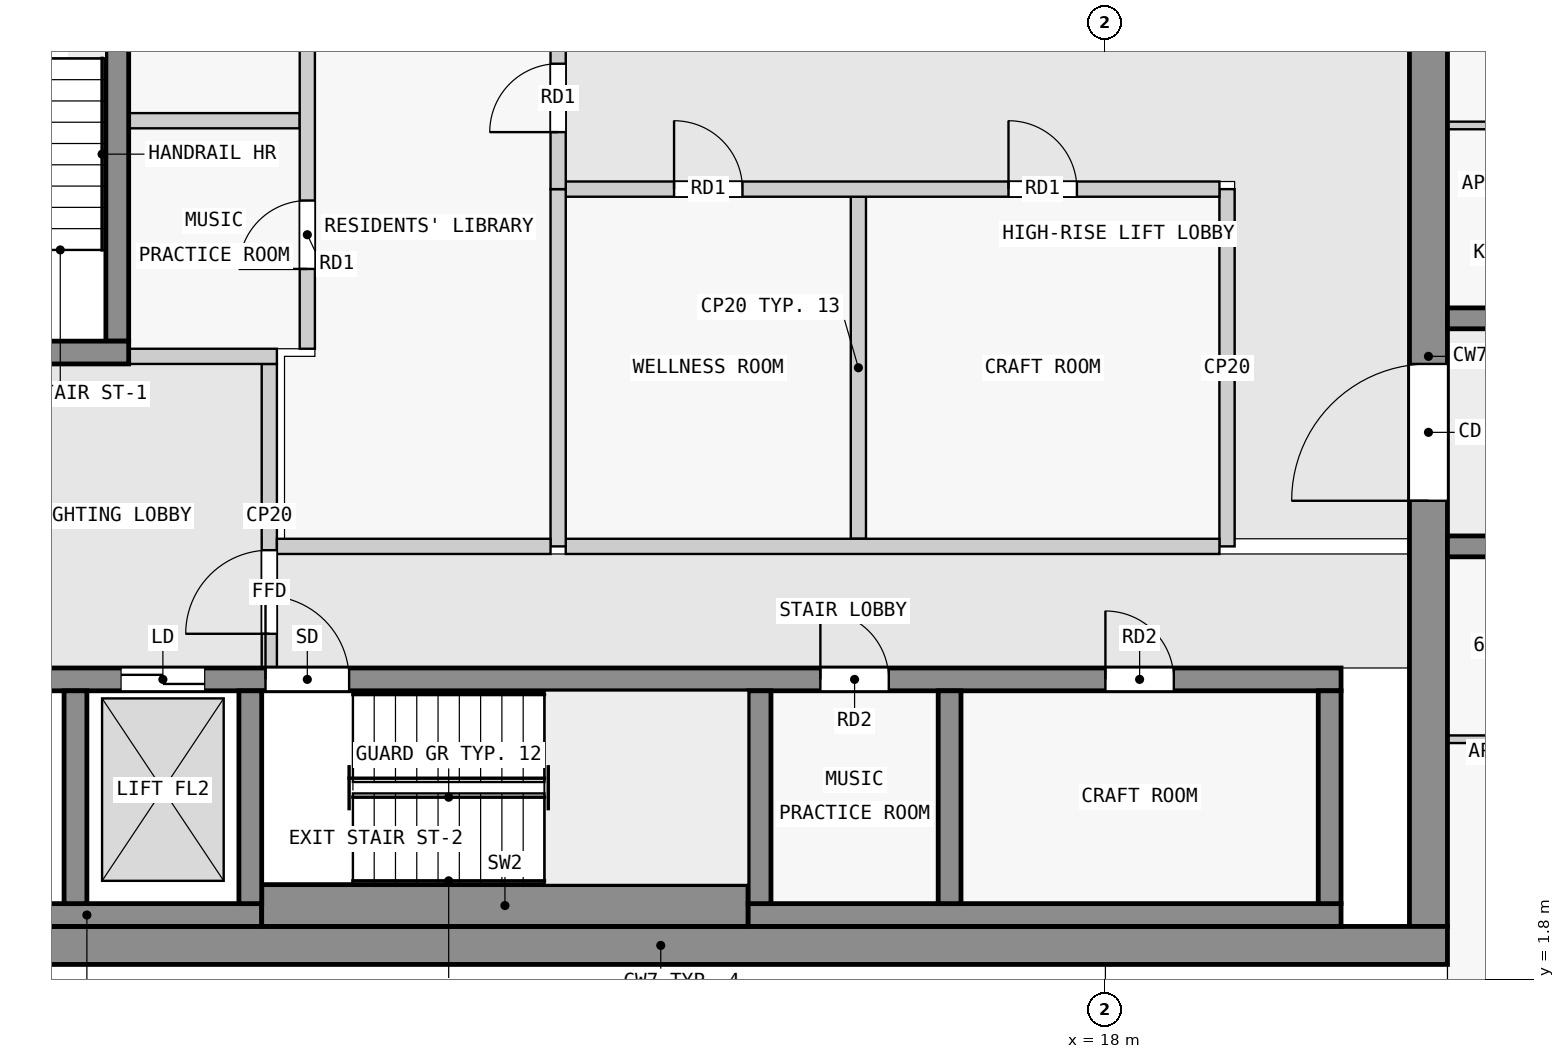
"""IFC4 building model, lengths in metres.
Left out: names, types, materials, properties, quantities, classifications, styles, units other than length and angle.
Written with IfcOpenShell. Run it as: python <this file> out.ifc"""

import sys

from ifc_helpers import new_model, si_unit, direction, frame, frame_2d, origin, place, context, subcontext, project, spatial, rectangle, extrude, element, fill, save


model = new_model("IFC4")
c1 = context("Model", 3, precision=1e-05, world=origin(), true_north=direction((0.0, 1.0)))
c2 = subcontext(c1, "Body", "Model", "MODEL_VIEW")
j1 = project(units=[si_unit("LENGTHUNIT", "METRE"), si_unit("PLANEANGLEUNIT", "RADIAN")], contexts=[c1])
p1 = place(None, origin())
s1 = spatial("IfcSite", under=j1, at=p1, CompositionType="ELEMENT")
p2 = place(p1, origin())
s2 = spatial("IfcBuilding", under=s1, at=p2, CompositionType="ELEMENT")
p3 = place(p2, frame((0.0, 0.0, 232.9)))
s3 = spatial("IfcBuildingStorey", under=s2, at=p3, CompositionType="ELEMENT", Elevation=232.9)
p4 = place(p3, frame((1.8, 2.25, 0.0), z_axis=(0.0, 0.0, 1.0), x_axis=(1.0, 0.0, 0.0)))
e1 = element("IfcWall", 1, at=p4, inside=s3, PredefinedType="SHEAR", context=c2, shape_type="SweptSolid", body=[
    extrude(rectangle(XDim=20.7, YDim=0.5, at=frame_2d((10.35, 0.0))), origin(), (0.0, 0.0, 1.0), 3.2),
])
p5 = place(p3, frame((22.25, 2.5, 0.0), z_axis=(0.0, 0.0, 1.0), x_axis=(0.0, 1.0, 0.0)))
e2 = element("IfcWall", 2, at=p5, inside=s3, PredefinedType="SHEAR", context=c2, shape_type="SweptSolid", body=[
    extrude(rectangle(XDim=15.0, YDim=0.5, at=frame_2d((7.5, 0.0))), origin(), (0.0, 0.0, 1.0), 3.2),
])
p6 = place(p5, frame((5.6, 0.0, 0.0)))
e3 = element("IfcOpeningElement", 3, at=p6, cuts=e2, PredefinedType="OPENING", context=c2, shape_type="SweptSolid", body=[
    extrude(rectangle(XDim=1.8, YDim=2.1, at=frame_2d((0.9, 1.05))), frame((0.0, 0.26, 0.0), z_axis=(0.0, -1.0, 0.0), x_axis=(1.0, 0.0, 0.0)), (0.0, 0.0, 1.0), 0.52),
])
p7 = place(p3, frame((2.3, 2.65, 0.0), z_axis=(0.0, 0.0, 1.0), x_axis=(1.0, 0.0, 0.0)))
e4 = element("IfcWall", 4, at=p7, inside=s3, PredefinedType="SHEAR", context=c2, shape_type="SweptSolid", body=[
    extrude(rectangle(XDim=4.6, YDim=0.3, at=frame_2d((2.3, 0.0))), origin(), (0.0, 0.0, 1.0), 3.2),
])
p8 = place(p3, frame((6.9, 2.775, 0.0), z_axis=(0.0, 0.0, 1.0), x_axis=(1.0, 0.0, 0.0)))
e5 = element("IfcWall", 5, at=p8, inside=s3, PredefinedType="SHEAR", context=c2, shape_type="SweptSolid", body=[
    extrude(rectangle(XDim=6.4, YDim=0.55, at=frame_2d((3.2, 0.0))), origin(), (0.0, 0.0, 1.0), 3.2),
])
p9 = place(p3, frame((13.3, 2.65, 0.0), z_axis=(0.0, 0.0, 1.0), x_axis=(1.0, 0.0, 0.0)))
e6 = element("IfcWall", 6, at=p9, inside=s3, PredefinedType="SHEAR", context=c2, shape_type="SweptSolid", body=[
    extrude(rectangle(XDim=7.8, YDim=0.3, at=frame_2d((3.9, 0.0))), origin(), (0.0, 0.0, 1.0), 3.2),
])
for number, where, z_axis, x_axis in (
    (7, (4.45, 2.8, 0.0), (0.0, 0.0, 1.0), (0.0, 1.0, 0.0)),
    (8, (6.75, 2.8, 0.0), (0.0, 0.0, 1.0), (0.0, 1.0, 0.0)),
    (9, (13.45, 2.8, 0.0), (0.0, 0.0, 1.0), (0.0, 1.0, 0.0)),
    (10, (15.95, 2.8, 0.0), (0.0, 0.0, 1.0), (0.0, 1.0, 0.0)),
    (11, (20.95, 2.8, 0.0), (0.0, 0.0, 1.0), (0.0, 1.0, 0.0)),
):
    element("IfcWall", number, at=place(p3, frame(where, z_axis=z_axis, x_axis=x_axis)), inside=s3, PredefinedType="SHEAR", context=c2, shape_type="SweptSolid", body=[
        extrude(rectangle(XDim=2.8, YDim=0.3, at=frame_2d((1.4, 0.0))), origin(), (0.0, 0.0, 1.0), 3.2),
    ])
p10 = place(p3, frame((2.3, 5.75, 0.0), z_axis=(0.0, 0.0, 1.0), x_axis=(1.0, 0.0, 0.0)))
e12 = element("IfcWall", 12, at=p10, inside=s3, PredefinedType="SHEAR", context=c2, shape_type="SweptSolid", body=[
    extrude(rectangle(XDim=18.8, YDim=0.3, at=frame_2d((9.4, 0.0))), origin(), (0.0, 0.0, 1.0), 3.2),
])
p11 = place(p10, frame((4.65, 0.0, 0.0)))
e13 = element("IfcOpeningElement", 13, at=p11, cuts=e12, PredefinedType="OPENING", context=c2, shape_type="SweptSolid", body=[
    extrude(rectangle(XDim=1.1, YDim=2.1, at=frame_2d((0.55, 1.05))), frame((0.0, 0.16, 0.0), z_axis=(0.0, -1.0, 0.0), x_axis=(1.0, 0.0, 0.0)), (0.0, 0.0, 1.0), 0.32),
])
p12 = place(p10, frame((0.45, 0.0, 0.0)))
e14 = element("IfcOpeningElement", 14, at=p12, cuts=e12, PredefinedType="OPENING", context=c2, shape_type="SweptSolid", body=[
    extrude(rectangle(XDim=1.1, YDim=2.1, at=frame_2d((0.55, 1.05))), frame((0.0, 0.16, 0.0), z_axis=(0.0, -1.0, 0.0), x_axis=(1.0, 0.0, 0.0)), (0.0, 0.0, 1.0), 0.32),
])
p13 = place(p10, frame((2.75, 0.0, 0.0)))
e15 = element("IfcOpeningElement", 15, at=p13, cuts=e12, PredefinedType="OPENING", context=c2, shape_type="SweptSolid", body=[
    extrude(rectangle(XDim=1.1, YDim=2.1, at=frame_2d((0.55, 1.05))), frame((0.0, 0.16, 0.0), z_axis=(0.0, -1.0, 0.0), x_axis=(1.0, 0.0, 0.0)), (0.0, 0.0, 1.0), 0.32),
])
p14 = place(p10, frame((11.95, 0.0, 0.0)))
e16 = element("IfcOpeningElement", 16, at=p14, cuts=e12, PredefinedType="OPENING", context=c2, shape_type="SweptSolid", body=[
    extrude(rectangle(XDim=0.9, YDim=2.1, at=frame_2d((0.45, 1.05))), frame((0.0, 0.16, 0.0), z_axis=(0.0, -1.0, 0.0), x_axis=(1.0, 0.0, 0.0)), (0.0, 0.0, 1.0), 0.32),
])
p15 = place(p10, frame((15.7, 0.0, 0.0)))
e17 = element("IfcOpeningElement", 17, at=p15, cuts=e12, PredefinedType="OPENING", context=c2, shape_type="SweptSolid", body=[
    extrude(rectangle(XDim=0.9, YDim=2.1, at=frame_2d((0.45, 1.05))), frame((0.0, 0.16, 0.0), z_axis=(0.0, -1.0, 0.0), x_axis=(1.0, 0.0, 0.0)), (0.0, 0.0, 1.0), 0.32),
])
p16 = place(p3, frame((2.3, 10.05, 0.0), z_axis=(0.0, 0.0, 1.0), x_axis=(1.0, 0.0, 0.0)))
e18 = element("IfcWall", 18, at=p16, inside=s3, PredefinedType="SHEAR", context=c2, shape_type="SweptSolid", body=[
    extrude(rectangle(XDim=2.85, YDim=0.3, at=frame_2d((1.425, 0.0))), origin(), (0.0, 0.0, 1.0), 3.2),
])
p17 = place(p16, frame((0.25, 0.0, 0.0)))
e19 = element("IfcOpeningElement", 19, at=p17, cuts=e18, PredefinedType="OPENING", context=c2, shape_type="SweptSolid", body=[
    extrude(rectangle(XDim=1.1, YDim=2.1, at=frame_2d((0.55, 1.05))), frame((0.0, 0.16, 0.0), z_axis=(0.0, -1.0, 0.0), x_axis=(1.0, 0.0, 0.0)), (0.0, 0.0, 1.0), 0.32),
])
p18 = place(p3, frame((5.0, 10.2, 0.0), z_axis=(0.0, 0.0, 1.0), x_axis=(0.0, 1.0, 0.0)))
e20 = element("IfcWall", 20, at=p18, inside=s3, PredefinedType="SHEAR", context=c2, shape_type="SweptSolid", body=[
    extrude(rectangle(XDim=6.4, YDim=0.3, at=frame_2d((3.2, 0.0))), origin(), (0.0, 0.0, 1.0), 3.2),
])
p19 = place(p3, frame((22.5, 7.5, 0.0), z_axis=(0.0, 0.0, 1.0), x_axis=(1.0, 0.0, 0.0)))
e21 = element("IfcWall", 21, at=p19, inside=s3, PredefinedType="SHEAR", context=c2, shape_type="SweptSolid", body=[
    extrude(rectangle(XDim=22.5, YDim=0.275, at=frame_2d((11.25, 0.0))), origin(), (0.0, 0.0, 1.0), 3.2),
])
p20 = place(p19, frame((1.75, 0.0, 0.0)))
e22 = element("IfcOpeningElement", 22, at=p20, cuts=e21, PredefinedType="OPENING", context=c2, shape_type="SweptSolid", body=[
    extrude(rectangle(XDim=1.0, YDim=2.1, at=frame_2d((0.5, 1.05))), frame((0.0, 0.147, 0.0), z_axis=(0.0, -1.0, 0.0), x_axis=(1.0, 0.0, 0.0)), (0.0, 0.0, 1.0), 0.295),
])
p21 = place(p19, frame((5.85, 0.0, 0.0)))
e23 = element("IfcOpeningElement", 23, at=p21, cuts=e21, PredefinedType="OPENING", context=c2, shape_type="SweptSolid", body=[
    extrude(rectangle(XDim=1.8, YDim=2.1, at=frame_2d((0.9, 1.05))), frame((0.0, 0.147, 0.0), z_axis=(0.0, -1.0, 0.0), x_axis=(1.0, 0.0, 0.0)), (0.0, 0.0, 1.0), 0.295),
])
p22 = place(p19, frame((10.75, 0.0, 0.0)))
e24 = element("IfcOpeningElement", 24, at=p22, cuts=e21, PredefinedType="OPENING", context=c2, shape_type="SweptSolid", body=[
    extrude(rectangle(XDim=1.0, YDim=2.1, at=frame_2d((0.5, 1.05))), frame((0.0, 0.147, 0.0), z_axis=(0.0, -1.0, 0.0), x_axis=(1.0, 0.0, 0.0)), (0.0, 0.0, 1.0), 0.295),
])
p23 = place(p19, frame((16.85, 0.0, 0.0)))
e25 = element("IfcOpeningElement", 25, at=p23, cuts=e21, PredefinedType="OPENING", context=c2, shape_type="SweptSolid", body=[
    extrude(rectangle(XDim=1.0, YDim=2.1, at=frame_2d((0.5, 1.05))), frame((0.0, 0.147, 0.0), z_axis=(0.0, -1.0, 0.0), x_axis=(1.0, 0.0, 0.0)), (0.0, 0.0, 1.0), 0.295),
])
p24 = place(p3, frame((22.5, 10.5, 0.0), z_axis=(0.0, 0.0, 1.0), x_axis=(1.0, 0.0, 0.0)))
e26 = element("IfcWall", 26, at=p24, inside=s3, PredefinedType="SHEAR", context=c2, shape_type="SweptSolid", body=[
    extrude(rectangle(XDim=22.5, YDim=0.275, at=frame_2d((11.25, 0.0))), origin(), (0.0, 0.0, 1.0), 3.2),
])
p25 = place(p24, frame((4.05, 0.0, 0.0)))
e27 = element("IfcOpeningElement", 27, at=p25, cuts=e26, PredefinedType="OPENING", context=c2, shape_type="SweptSolid", body=[
    extrude(rectangle(XDim=1.0, YDim=2.1, at=frame_2d((0.5, 1.05))), frame((0.0, 0.147, 0.0), z_axis=(0.0, -1.0, 0.0), x_axis=(1.0, 0.0, 0.0)), (0.0, 0.0, 1.0), 0.295),
])
p26 = place(p24, frame((10.75, 0.0, 0.0)))
e28 = element("IfcOpeningElement", 28, at=p26, cuts=e26, PredefinedType="OPENING", context=c2, shape_type="SweptSolid", body=[
    extrude(rectangle(XDim=1.0, YDim=2.1, at=frame_2d((0.5, 1.05))), frame((0.0, 0.147, 0.0), z_axis=(0.0, -1.0, 0.0), x_axis=(1.0, 0.0, 0.0)), (0.0, 0.0, 1.0), 0.295),
])
p27 = place(p24, frame((15.25, 0.0, 0.0)))
e29 = element("IfcOpeningElement", 29, at=p27, cuts=e26, PredefinedType="OPENING", context=c2, shape_type="SweptSolid", body=[
    extrude(rectangle(XDim=1.0, YDim=2.1, at=frame_2d((0.5, 1.05))), frame((0.0, 0.147, 0.0), z_axis=(0.0, -1.0, 0.0), x_axis=(1.0, 0.0, 0.0)), (0.0, 0.0, 1.0), 0.295),
])
p28 = place(p24, frame((18.75, 0.0, 0.0)))
e30 = element("IfcOpeningElement", 30, at=p28, cuts=e26, PredefinedType="OPENING", context=c2, shape_type="SweptSolid", body=[
    extrude(rectangle(XDim=0.9, YDim=2.1, at=frame_2d((0.45, 1.05))), frame((0.0, 0.147, 0.0), z_axis=(0.0, -1.0, 0.0), x_axis=(1.0, 0.0, 0.0)), (0.0, 0.0, 1.0), 0.295),
])
p29 = place(p24, frame((20.95, 0.0, 0.0)))
e31 = element("IfcOpeningElement", 31, at=p29, cuts=e26, PredefinedType="OPENING", context=c2, shape_type="SweptSolid", body=[
    extrude(rectangle(XDim=1.0, YDim=2.1, at=frame_2d((0.5, 1.05))), frame((0.0, 0.147, 0.0), z_axis=(0.0, -1.0, 0.0), x_axis=(1.0, 0.0, 0.0)), (0.0, 0.0, 1.0), 0.295),
])
p30 = place(p3, frame((7.0, 5.9, 0.0), z_axis=(0.0, 0.0, 1.0), x_axis=(0.0, 1.0, 0.0)))
e32 = element("IfcWall", 32, at=p30, inside=s3, PredefinedType="PARTITIONING", context=c2, shape_type="SweptSolid", body=[
    extrude(rectangle(XDim=4.0, YDim=0.2, at=frame_2d((2.0, 0.0))), origin(), (0.0, 0.0, 1.0), 3.2),
])
p31 = place(p30, frame((0.45, 0.0, 0.0)))
e33 = element("IfcOpeningElement", 33, at=p31, cuts=e32, PredefinedType="OPENING", context=c2, shape_type="SweptSolid", body=[
    extrude(rectangle(XDim=1.1, YDim=2.1, at=frame_2d((0.55, 1.05))), frame((0.0, 0.11, 0.0), z_axis=(0.0, -1.0, 0.0), x_axis=(1.0, 0.0, 0.0)), (0.0, 0.0, 1.0), 0.22),
])
p32 = place(p3, frame((5.15, 10.0, 0.0), z_axis=(0.0, 0.0, 1.0), x_axis=(1.0, 0.0, 0.0)))
e34 = element("IfcWall", 34, at=p32, inside=s3, PredefinedType="PARTITIONING", context=c2, shape_type="SweptSolid", body=[
    extrude(rectangle(XDim=1.95, YDim=0.2, at=frame_2d((0.975, 0.0))), origin(), (0.0, 0.0, 1.0), 3.2),
])
p33 = place(p3, frame((7.1, 7.5, 0.0), z_axis=(0.0, 0.0, 1.0), x_axis=(1.0, 0.0, 0.0)))
e35 = element("IfcWall", 35, at=p33, inside=s3, PredefinedType="PARTITIONING", context=c2, shape_type="SweptSolid", body=[
    extrude(rectangle(XDim=3.6, YDim=0.2, at=frame_2d((1.8, 0.0))), origin(), (0.0, 0.0, 1.0), 3.2),
])
p34 = place(p3, frame((10.8, 12.2, 0.0), z_axis=(0.0, 0.0, 1.0), x_axis=(0.0, 1.0, 0.0)))
e36 = element("IfcWall", 36, at=p34, inside=s3, PredefinedType="PARTITIONING", context=c2, shape_type="SweptSolid", body=[
    extrude(rectangle(XDim=2.4, YDim=0.2, at=frame_2d((1.2, 0.0))), origin(), (0.0, 0.0, 1.0), 3.2),
])
p35 = place(p34, frame((0.75, 0.0, 0.0)))
e37 = element("IfcOpeningElement", 37, at=p35, cuts=e36, PredefinedType="OPENING", context=c2, shape_type="SweptSolid", body=[
    extrude(rectangle(XDim=0.9, YDim=2.1, at=frame_2d((0.45, 1.05))), frame((0.0, 0.11, 0.0), z_axis=(0.0, -1.0, 0.0), x_axis=(1.0, 0.0, 0.0)), (0.0, 0.0, 1.0), 0.22),
])
p36 = place(p3, frame((10.8, 7.5, 0.0), z_axis=(0.0, 0.0, 1.0), x_axis=(0.0, 1.0, 0.0)))
e38 = element("IfcWall", 38, at=p36, inside=s3, PredefinedType="PARTITIONING", context=c2, shape_type="SweptSolid", body=[
    extrude(rectangle(XDim=4.7, YDim=0.2, at=frame_2d((2.35, 0.0))), origin(), (0.0, 0.0, 1.0), 3.2),
])
p37 = place(p3, frame((10.9, 7.5, 0.0), z_axis=(0.0, 0.0, 1.0), x_axis=(1.0, 0.0, 0.0)))
e39 = element("IfcWall", 39, at=p37, inside=s3, PredefinedType="PARTITIONING", context=c2, shape_type="SweptSolid", body=[
    extrude(rectangle(XDim=8.6, YDim=0.2, at=frame_2d((4.3, 0.0))), origin(), (0.0, 0.0, 1.0), 3.2),
])
p38 = place(p3, frame((19.6, 7.5, 0.0), z_axis=(0.0, 0.0, 1.0), x_axis=(0.0, 1.0, 0.0)))
e40 = element("IfcWall", 40, at=p38, inside=s3, PredefinedType="PARTITIONING", context=c2, shape_type="SweptSolid", body=[
    extrude(rectangle(XDim=4.7, YDim=0.2, at=frame_2d((2.35, 0.0))), origin(), (0.0, 0.0, 1.0), 3.2),
])
p39 = place(p3, frame((10.9, 12.2, 0.0), z_axis=(0.0, 0.0, 1.0), x_axis=(1.0, 0.0, 0.0)))
e41 = element("IfcWall", 41, at=p39, inside=s3, PredefinedType="PARTITIONING", context=c2, shape_type="SweptSolid", body=[
    extrude(rectangle(XDim=8.6, YDim=0.2, at=frame_2d((4.3, 0.0))), origin(), (0.0, 0.0, 1.0), 3.2),
])
p40 = place(p39, frame((1.425, 0.0, 0.0)))
e42 = element("IfcOpeningElement", 42, at=p40, cuts=e41, PredefinedType="OPENING", context=c2, shape_type="SweptSolid", body=[
    extrude(rectangle(XDim=0.9, YDim=2.1, at=frame_2d((0.45, 1.05))), frame((0.0, 0.11, 0.0), z_axis=(0.0, -1.0, 0.0), x_axis=(1.0, 0.0, 0.0)), (0.0, 0.0, 1.0), 0.22),
])
p41 = place(p39, frame((5.825, 0.0, 0.0)))
e43 = element("IfcOpeningElement", 43, at=p41, cuts=e41, PredefinedType="OPENING", context=c2, shape_type="SweptSolid", body=[
    extrude(rectangle(XDim=0.9, YDim=2.1, at=frame_2d((0.45, 1.05))), frame((0.0, 0.11, 0.0), z_axis=(0.0, -1.0, 0.0), x_axis=(1.0, 0.0, 0.0)), (0.0, 0.0, 1.0), 0.22),
])
p42 = place(p3, frame((14.75, 7.6, 0.0), z_axis=(0.0, 0.0, 1.0), x_axis=(0.0, 1.0, 0.0)))
e44 = element("IfcWall", 44, at=p42, inside=s3, PredefinedType="PARTITIONING", context=c2, shape_type="SweptSolid", body=[
    extrude(rectangle(XDim=4.5, YDim=0.2, at=frame_2d((2.25, 0.0))), origin(), (0.0, 0.0, 1.0), 3.2),
])
p43 = place(p3, frame((7.5, 10.1, 0.0), z_axis=(0.0, 0.0, 1.0), x_axis=(0.0, 1.0, 0.0)))
e45 = element("IfcWall", 45, at=p43, inside=s3, PredefinedType="PARTITIONING", context=c2, shape_type="SweptSolid", body=[
    extrude(rectangle(XDim=7.4, YDim=0.2, at=frame_2d((3.7, 0.0))), origin(), (0.0, 0.0, 1.0), 3.2),
])
p44 = place(p43, frame((1.05, 0.0, 0.0)))
e46 = element("IfcOpeningElement", 46, at=p44, cuts=e45, PredefinedType="OPENING", context=c2, shape_type="SweptSolid", body=[
    extrude(rectangle(XDim=0.9, YDim=2.1, at=frame_2d((0.45, 1.05))), frame((0.0, 0.11, 0.0), z_axis=(0.0, -1.0, 0.0), x_axis=(1.0, 0.0, 0.0)), (0.0, 0.0, 1.0), 0.22),
])
p45 = place(p43, frame((4.75, 0.0, 0.0)))
e47 = element("IfcOpeningElement", 47, at=p45, cuts=e45, PredefinedType="OPENING", context=c2, shape_type="SweptSolid", body=[
    extrude(rectangle(XDim=0.9, YDim=2.1, at=frame_2d((0.45, 1.05))), frame((0.0, 0.11, 0.0), z_axis=(0.0, -1.0, 0.0), x_axis=(1.0, 0.0, 0.0)), (0.0, 0.0, 1.0), 0.22),
])
p46 = place(p3, frame((5.15, 13.1, 0.0), z_axis=(0.0, 0.0, 1.0), x_axis=(1.0, 0.0, 0.0)))
e48 = element("IfcWall", 48, at=p46, inside=s3, PredefinedType="PARTITIONING", context=c2, shape_type="SweptSolid", body=[
    extrude(rectangle(XDim=2.25, YDim=0.2, at=frame_2d((1.125, 0.0))), origin(), (0.0, 0.0, 1.0), 3.2),
])
p47 = place(p3, frame((22.5, 4.962, 0.0), z_axis=(0.0, 0.0, 1.0), x_axis=(1.0, 0.0, 0.0)))
e49 = element("IfcWall", 49, at=p47, inside=s3, PredefinedType="PARTITIONING", context=c2, shape_type="SweptSolid", body=[
    extrude(rectangle(XDim=1.45, YDim=0.1, at=frame_2d((0.725, 0.0))), origin(), (0.0, 0.0, 1.0), 3.2),
])
p48 = place(p3, frame((24.25, 13.038, 0.0), z_axis=(0.0, 0.0, 1.0), x_axis=(-1.0, 0.0, 0.0)))
e50 = element("IfcWall", 50, at=p48, inside=s3, PredefinedType="PARTITIONING", context=c2, shape_type="SweptSolid", body=[
    extrude(rectangle(XDim=1.75, YDim=0.1, at=frame_2d((0.875, 0.0))), origin(), (0.0, 0.0, 1.0), 3.2),
])
p49 = place(p31, origin())
e51 = element("IfcDoor", 51, at=p49, inside=s3, OperationType="SINGLE_SWING_LEFT", PredefinedType="DOOR", context=c2, shape_type="SweptSolid", body=[
    extrude(rectangle(XDim=1.1, YDim=2.1, at=frame_2d((0.55, 1.05))), frame((0.0, 0.025, 0.0), z_axis=(0.0, -1.0, 0.0), x_axis=(1.0, 0.0, 0.0)), (0.0, 0.0, 1.0), 0.05),
])
fill(e33, e51)
p50 = place(p35, origin())
e52 = element("IfcDoor", 52, at=p50, inside=s3, OperationType="SINGLE_SWING_LEFT", PredefinedType="DOOR", context=c2, shape_type="SweptSolid", body=[
    extrude(rectangle(XDim=0.9, YDim=2.1, at=frame_2d((0.45, 1.05))), frame((0.0, 0.025, 0.0), z_axis=(0.0, -1.0, 0.0), x_axis=(1.0, 0.0, 0.0)), (0.0, 0.0, 1.0), 0.05),
])
fill(e37, e52)
p51 = place(p40, origin())
e53 = element("IfcDoor", 53, at=p51, inside=s3, OperationType="SINGLE_SWING_LEFT", PredefinedType="DOOR", context=c2, shape_type="SweptSolid", body=[
    extrude(rectangle(XDim=0.9, YDim=2.1, at=frame_2d((0.45, 1.05))), frame((0.0, 0.025, 0.0), z_axis=(0.0, -1.0, 0.0), x_axis=(1.0, 0.0, 0.0)), (0.0, 0.0, 1.0), 0.05),
])
fill(e42, e53)
p52 = place(p41, origin())
e54 = element("IfcDoor", 54, at=p52, inside=s3, OperationType="SINGLE_SWING_LEFT", PredefinedType="DOOR", context=c2, shape_type="SweptSolid", body=[
    extrude(rectangle(XDim=0.9, YDim=2.1, at=frame_2d((0.45, 1.05))), frame((0.0, 0.025, 0.0), z_axis=(0.0, -1.0, 0.0), x_axis=(1.0, 0.0, 0.0)), (0.0, 0.0, 1.0), 0.05),
])
fill(e43, e54)
p53 = place(p11, origin())
e55 = element("IfcDoor", 55, at=p53, inside=s3, OperationType="SINGLE_SWING_LEFT", PredefinedType="DOOR", context=c2, shape_type="SweptSolid", body=[
    extrude(rectangle(XDim=1.1, YDim=2.1, at=frame_2d((0.55, 1.05))), frame((0.0, 0.025, 0.0), z_axis=(0.0, -1.0, 0.0), x_axis=(1.0, 0.0, 0.0)), (0.0, 0.0, 1.0), 0.05),
])
fill(e13, e55)
p54 = place(p13, origin())
e56 = element("IfcDoor", 56, at=p54, inside=s3, OperationType="DOUBLE_DOOR_SLIDING", PredefinedType="DOOR", context=c2, shape_type="SweptSolid", body=[
    extrude(rectangle(XDim=1.1, YDim=2.1, at=frame_2d((0.55, 1.05))), frame((0.0, 0.025, 0.0), z_axis=(0.0, -1.0, 0.0), x_axis=(1.0, 0.0, 0.0)), (0.0, 0.0, 1.0), 0.05),
])
fill(e15, e56)
p55 = place(p6, origin())
e57 = element("IfcDoor", 57, at=p55, inside=s3, OperationType="DOUBLE_DOOR_SINGLE_SWING", PredefinedType="DOOR", context=c2, shape_type="SweptSolid", body=[
    extrude(rectangle(XDim=1.8, YDim=2.1, at=frame_2d((0.9, 1.05))), frame((0.0, 0.025, 0.0), z_axis=(0.0, -1.0, 0.0), x_axis=(1.0, 0.0, 0.0)), (0.0, 0.0, 1.0), 0.05),
])
fill(e3, e57)
p56 = place(p44, origin())
e58 = element("IfcDoor", 58, at=p56, inside=s3, OperationType="SINGLE_SWING_RIGHT", PredefinedType="DOOR", context=c2, shape_type="SweptSolid", body=[
    extrude(rectangle(XDim=0.9, YDim=2.1, at=frame_2d((0.45, 1.05))), frame((0.0, 0.025, 0.0), z_axis=(0.0, -1.0, 0.0), x_axis=(1.0, 0.0, 0.0)), (0.0, 0.0, 1.0), 0.05),
])
fill(e46, e58)
p57 = place(p14, origin())
e59 = element("IfcDoor", 59, at=p57, inside=s3, OperationType="SINGLE_SWING_LEFT", PredefinedType="DOOR", context=c2, shape_type="SweptSolid", body=[
    extrude(rectangle(XDim=0.9, YDim=2.1, at=frame_2d((0.45, 1.05))), frame((0.0, 0.025, 0.0), z_axis=(0.0, -1.0, 0.0), x_axis=(1.0, 0.0, 0.0)), (0.0, 0.0, 1.0), 0.05),
])
fill(e16, e59)
p58 = place(p15, origin())
e60 = element("IfcDoor", 60, at=p58, inside=s3, OperationType="SINGLE_SWING_LEFT", PredefinedType="DOOR", context=c2, shape_type="SweptSolid", body=[
    extrude(rectangle(XDim=0.9, YDim=2.1, at=frame_2d((0.45, 1.05))), frame((0.0, 0.025, 0.0), z_axis=(0.0, -1.0, 0.0), x_axis=(1.0, 0.0, 0.0)), (0.0, 0.0, 1.0), 0.05),
])
fill(e17, e60)
save(model, sys.argv[1])
